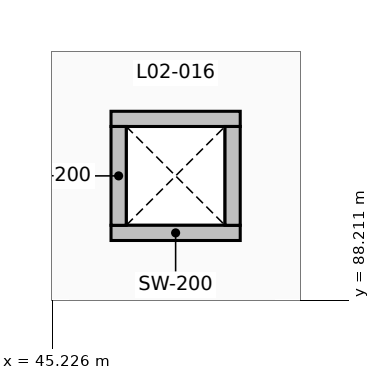
"""IFC4 building model, lengths in metres.
Left out: names, types, materials, properties, quantities, classifications, styles, units other than length and angle.
Written with IfcOpenShell. Run it as: python <this file> out.ifc"""

import sys

from ifc_helpers import new_model, si_unit, direction, frame, frame_2d, origin, place, context, subcontext, project, spatial, rectangle, extrude, element, save


model = new_model("IFC4")
c1 = context("Model", 3, precision=1e-05, world=origin(), true_north=direction((0.0, 1.0)))
c2 = subcontext(c1, "Body", "Model", "MODEL_VIEW")
j1 = project(units=[si_unit("LENGTHUNIT", "METRE"), si_unit("PLANEANGLEUNIT", "RADIAN")], contexts=[c1])
p1 = place(None, origin())
s1 = spatial("IfcSite", under=j1, at=p1, CompositionType="ELEMENT")
p2 = place(p1, origin())
s2 = spatial("IfcBuilding", under=s1, at=p2, CompositionType="ELEMENT")
p3 = place(p2, frame((0.0, 0.0, 10.2)))
s3 = spatial("IfcBuildingStorey", under=s2, at=p3, CompositionType="ELEMENT", Elevation=10.2)
for number, where, z_axis, x_axis in (
    (1, (46.0, 89.1, 0.0), (0.0, 0.0, 1.0), (1.0, 0.0, 0.0)),
    (2, (47.7, 90.6, 0.0), (0.0, 0.0, 1.0), (-1.0, 0.0, 0.0)),
):
    element("IfcWall", number, at=place(p3, frame(where, z_axis=z_axis, x_axis=x_axis)), inside=s3, PredefinedType="PARTITIONING", context=c2, shape_type="SweptSolid", body=[
        extrude(rectangle(XDim=1.7, YDim=0.2, at=frame_2d((0.85, 0.0))), origin(), (0.0, 0.0, 1.0), 4.5),
    ])
for number, where, z_axis, x_axis in (
    (3, (46.1, 89.2, 0.0), (0.0, 0.0, 1.0), (0.0, 1.0, 0.0)),
    (4, (47.6, 90.5, 0.0), (0.0, 0.0, 1.0), (0.0, -1.0, 0.0)),
):
    element("IfcWall", number, at=place(p3, frame(where, z_axis=z_axis, x_axis=x_axis)), inside=s3, PredefinedType="PARTITIONING", context=c2, shape_type="SweptSolid", body=[
        extrude(rectangle(XDim=1.3, YDim=0.2, at=frame_2d((0.65, 0.0))), origin(), (0.0, 0.0, 1.0), 4.5),
    ])
save(model, sys.argv[1])
